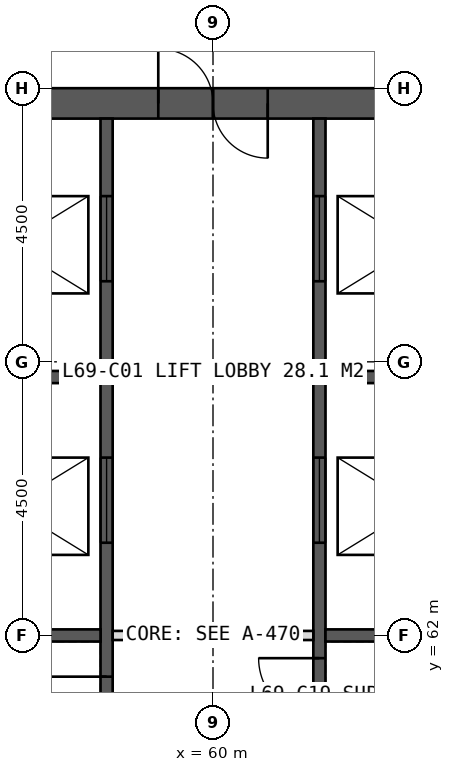
"""IFC4 building model, lengths in metres.
Left out: names, types, materials, properties, quantities, classifications, styles, units other than length and angle.
Written with IfcOpenShell. Run it as: python <this file> out.ifc"""

import sys

from ifc_helpers import new_model, si_unit, direction, frame, frame_2d, origin, place, context, subcontext, project, spatial, rectangle, extrude, element, fill, save


model = new_model("IFC4")
c1 = context("Model", 3, precision=1e-05, world=origin(), true_north=direction((0.0, 1.0)))
c2 = subcontext(c1, "Body", "Model", "MODEL_VIEW")
j1 = project(units=[si_unit("LENGTHUNIT", "METRE"), si_unit("PLANEANGLEUNIT", "RADIAN")], contexts=[c1])
p1 = place(None, origin())
s1 = spatial("IfcSite", under=j1, at=p1, CompositionType="ELEMENT")
p2 = place(p1, origin())
s2 = spatial("IfcBuilding", under=s1, at=p2, CompositionType="ELEMENT")
p3 = place(p2, frame((0.0, 0.0, 286.0)))
s3 = spatial("IfcBuildingStorey", under=s2, at=p3, CompositionType="ELEMENT", Elevation=286.0)
p4 = place(p3, frame((51.0, 70.75, 0.0), z_axis=(0.0, 0.0, 1.0), x_axis=(1.0, 0.0, 0.0)))
e1 = element("IfcWall", 1, at=p4, inside=s3, PredefinedType="SHEAR", context=c2, shape_type="SweptSolid", body=[
    extrude(rectangle(XDim=18.0, YDim=0.5, at=frame_2d((9.0, 0.0))), origin(), (0.0, 0.0, 1.0), 4.0),
])
p5 = place(p4, frame((8.1, 0.0, 0.0)))
e2 = element("IfcOpeningElement", 2, at=p5, cuts=e1, PredefinedType="OPENING", context=c2, shape_type="SweptSolid", body=[
    extrude(rectangle(XDim=1.8, YDim=2.2, at=frame_2d((0.9, 1.1))), frame((0.0, 0.26, 0.0), z_axis=(0.0, -1.0, 0.0), x_axis=(1.0, 0.0, 0.0)), (0.0, 0.0, 1.0), 0.52),
])
p6 = place(p3, frame((58.25, 53.5, 0.0), z_axis=(0.0, 0.0, 1.0), x_axis=(0.0, 1.0, 0.0)))
e3 = element("IfcWall", 3, at=p6, inside=s3, PredefinedType="SHEAR", context=c2, shape_type="SweptSolid", body=[
    extrude(rectangle(XDim=17.0, YDim=0.2, at=frame_2d((8.5, 0.0))), origin(), (0.0, 0.0, 1.0), 4.0),
])
p7 = place(p6, frame((0.808, 0.0, 0.0)))
e4 = element("IfcOpeningElement", 4, at=p7, cuts=e3, PredefinedType="OPENING", context=c2, shape_type="SweptSolid", body=[
    extrude(rectangle(XDim=1.0, YDim=2.1, at=frame_2d((0.5, 1.05))), frame((0.0, 0.11, 0.0), z_axis=(0.0, -1.0, 0.0), x_axis=(1.0, 0.0, 0.0)), (0.0, 0.0, 1.0), 0.22),
])
p8 = place(p6, frame((2.958, 0.0, 0.0)))
e5 = element("IfcOpeningElement", 5, at=p8, cuts=e3, PredefinedType="OPENING", context=c2, shape_type="SweptSolid", body=[
    extrude(rectangle(XDim=1.0, YDim=2.1, at=frame_2d((0.5, 1.05))), frame((0.0, 0.11, 0.0), z_axis=(0.0, -1.0, 0.0), x_axis=(1.0, 0.0, 0.0)), (0.0, 0.0, 1.0), 0.22),
])
p9 = place(p6, frame((4.722, 0.0, 0.0)))
e6 = element("IfcOpeningElement", 6, at=p9, cuts=e3, PredefinedType="OPENING", context=c2, shape_type="SweptSolid", body=[
    extrude(rectangle(XDim=1.0, YDim=2.1, at=frame_2d((0.5, 1.05))), frame((0.0, 0.11, 0.0), z_axis=(0.0, -1.0, 0.0), x_axis=(1.0, 0.0, 0.0)), (0.0, 0.0, 1.0), 0.22),
])
p10 = place(p6, frame((6.823, 0.0, 0.0)))
e7 = element("IfcOpeningElement", 7, at=p10, cuts=e3, PredefinedType="OPENING", context=c2, shape_type="SweptSolid", body=[
    extrude(rectangle(XDim=1.0, YDim=2.1, at=frame_2d((0.5, 1.05))), frame((0.0, 0.11, 0.0), z_axis=(0.0, -1.0, 0.0), x_axis=(1.0, 0.0, 0.0)), (0.0, 0.0, 1.0), 0.22),
])
p11 = place(p6, frame((10.025, 0.0, 0.0)))
e8 = element("IfcOpeningElement", 8, at=p11, cuts=e3, PredefinedType="OPENING", context=c2, shape_type="SweptSolid", body=[
    extrude(rectangle(XDim=1.4, YDim=2.2, at=frame_2d((0.7, 1.1))), frame((0.0, 0.11, 0.0), z_axis=(0.0, -1.0, 0.0), x_axis=(1.0, 0.0, 0.0)), (0.0, 0.0, 1.0), 0.22),
])
p12 = place(p6, frame((14.325, 0.0, 0.0)))
e9 = element("IfcOpeningElement", 9, at=p12, cuts=e3, PredefinedType="OPENING", context=c2, shape_type="SweptSolid", body=[
    extrude(rectangle(XDim=1.4, YDim=2.2, at=frame_2d((0.7, 1.1))), frame((0.0, 0.11, 0.0), z_axis=(0.0, -1.0, 0.0), x_axis=(1.0, 0.0, 0.0)), (0.0, 0.0, 1.0), 0.22),
])
p13 = place(p3, frame((61.75, 53.5, 0.0), z_axis=(0.0, 0.0, 1.0), x_axis=(0.0, 1.0, 0.0)))
e10 = element("IfcWall", 10, at=p13, inside=s3, PredefinedType="SHEAR", context=c2, shape_type="SweptSolid", body=[
    extrude(rectangle(XDim=17.0, YDim=0.2, at=frame_2d((8.5, 0.0))), origin(), (0.0, 0.0, 1.0), 4.0),
])
p14 = place(p13, frame((0.496, 0.0, 0.0)))
e11 = element("IfcOpeningElement", 11, at=p14, cuts=e10, PredefinedType="OPENING", context=c2, shape_type="SweptSolid", body=[
    extrude(rectangle(XDim=1.0, YDim=2.1, at=frame_2d((0.5, 1.05))), frame((0.0, 0.11, 0.0), z_axis=(0.0, -1.0, 0.0), x_axis=(1.0, 0.0, 0.0)), (0.0, 0.0, 1.0), 0.22),
])
p15 = place(p13, frame((2.646, 0.0, 0.0)))
e12 = element("IfcOpeningElement", 12, at=p15, cuts=e10, PredefinedType="OPENING", context=c2, shape_type="SweptSolid", body=[
    extrude(rectangle(XDim=1.0, YDim=2.1, at=frame_2d((0.5, 1.05))), frame((0.0, 0.11, 0.0), z_axis=(0.0, -1.0, 0.0), x_axis=(1.0, 0.0, 0.0)), (0.0, 0.0, 1.0), 0.22),
])
p16 = place(p13, frame((5.027, 0.0, 0.0)))
e13 = element("IfcOpeningElement", 13, at=p16, cuts=e10, PredefinedType="OPENING", context=c2, shape_type="SweptSolid", body=[
    extrude(rectangle(XDim=1.0, YDim=2.1, at=frame_2d((0.5, 1.05))), frame((0.0, 0.11, 0.0), z_axis=(0.0, -1.0, 0.0), x_axis=(1.0, 0.0, 0.0)), (0.0, 0.0, 1.0), 0.22),
])
p17 = place(p13, frame((7.126, 0.0, 0.0)))
e14 = element("IfcOpeningElement", 14, at=p17, cuts=e10, PredefinedType="OPENING", context=c2, shape_type="SweptSolid", body=[
    extrude(rectangle(XDim=1.0, YDim=2.1, at=frame_2d((0.5, 1.05))), frame((0.0, 0.11, 0.0), z_axis=(0.0, -1.0, 0.0), x_axis=(1.0, 0.0, 0.0)), (0.0, 0.0, 1.0), 0.22),
])
p18 = place(p13, frame((10.025, 0.0, 0.0)))
e15 = element("IfcOpeningElement", 15, at=p18, cuts=e10, PredefinedType="OPENING", context=c2, shape_type="SweptSolid", body=[
    extrude(rectangle(XDim=1.4, YDim=2.2, at=frame_2d((0.7, 1.1))), frame((0.0, 0.11, 0.0), z_axis=(0.0, -1.0, 0.0), x_axis=(1.0, 0.0, 0.0)), (0.0, 0.0, 1.0), 0.22),
])
p19 = place(p13, frame((14.325, 0.0, 0.0)))
e16 = element("IfcOpeningElement", 16, at=p19, cuts=e10, PredefinedType="OPENING", context=c2, shape_type="SweptSolid", body=[
    extrude(rectangle(XDim=1.4, YDim=2.2, at=frame_2d((0.7, 1.1))), frame((0.0, 0.11, 0.0), z_axis=(0.0, -1.0, 0.0), x_axis=(1.0, 0.0, 0.0)), (0.0, 0.0, 1.0), 0.22),
])
for number, where, z_axis, x_axis in (
    (17, (55.1, 62.0, 0.0), (0.0, 0.0, 1.0), (1.0, 0.0, 0.0)),
    (18, (61.85, 62.0, 0.0), (0.0, 0.0, 1.0), (1.0, 0.0, 0.0)),
    (19, (55.1, 66.25, 0.0), (0.0, 0.0, 1.0), (1.0, 0.0, 0.0)),
    (20, (61.85, 66.25, 0.0), (0.0, 0.0, 1.0), (1.0, 0.0, 0.0)),
):
    element("IfcWall", number, at=place(p3, frame(where, z_axis=z_axis, x_axis=x_axis)), inside=s3, PredefinedType="SHEAR", context=c2, shape_type="SweptSolid", body=[
        extrude(rectangle(XDim=3.05, YDim=0.2, at=frame_2d((1.525, 0.0))), origin(), (0.0, 0.0, 1.0), 4.0),
    ])
p20 = place(p3, frame((58.35, 62.0, 0.0), z_axis=(0.0, 0.0, 1.0), x_axis=(1.0, 0.0, 0.0)))
e21 = element("IfcWall", 21, at=p20, inside=s3, PredefinedType="PARTITIONING", context=c2, shape_type="SweptSolid", body=[
    extrude(rectangle(XDim=3.3, YDim=0.15, at=frame_2d((1.65, 0.0))), origin(), (0.0, 0.0, 1.0), 3.75),
])
p21 = place(p5, origin())
e22 = element("IfcDoor", 22, at=p21, inside=s3, OperationType="DOUBLE_DOOR_SINGLE_SWING", PredefinedType="DOOR", context=c2, shape_type="SweptSolid", body=[
    extrude(rectangle(XDim=1.8, YDim=2.2, at=frame_2d((0.9, 1.1))), frame((0.0, 0.025, 0.0), z_axis=(0.0, -1.0, 0.0), x_axis=(1.0, 0.0, 0.0)), (0.0, 0.0, 1.0), 0.05),
])
fill(e2, e22)
p22 = place(p10, origin())
e23 = element("IfcDoor", 23, at=p22, inside=s3, OperationType="SINGLE_SWING_RIGHT", PredefinedType="DOOR", context=c2, shape_type="SweptSolid", body=[
    extrude(rectangle(XDim=1.0, YDim=2.1, at=frame_2d((0.5, 1.05))), frame((0.0, 0.025, 0.0), z_axis=(0.0, -1.0, 0.0), x_axis=(1.0, 0.0, 0.0)), (0.0, 0.0, 1.0), 0.05),
])
fill(e7, e23)
p23 = place(p17, origin())
e24 = element("IfcDoor", 24, at=p23, inside=s3, OperationType="SINGLE_SWING_RIGHT", PredefinedType="DOOR", context=c2, shape_type="SweptSolid", body=[
    extrude(rectangle(XDim=1.0, YDim=2.1, at=frame_2d((0.5, 1.05))), frame((0.0, 0.025, 0.0), z_axis=(0.0, -1.0, 0.0), x_axis=(1.0, 0.0, 0.0)), (0.0, 0.0, 1.0), 0.05),
])
fill(e14, e24)
p24 = place(p11, origin())
e25 = element("IfcDoor", 25, at=p24, inside=s3, OperationType="SLIDING_TO_LEFT", PredefinedType="DOOR", context=c2, shape_type="SweptSolid", body=[
    extrude(rectangle(XDim=1.4, YDim=2.2, at=frame_2d((0.7, 1.1))), frame((0.0, 0.025, 0.0), z_axis=(0.0, -1.0, 0.0), x_axis=(1.0, 0.0, 0.0)), (0.0, 0.0, 1.0), 0.05),
])
fill(e8, e25)
p25 = place(p18, origin())
e26 = element("IfcDoor", 26, at=p25, inside=s3, OperationType="SLIDING_TO_LEFT", PredefinedType="DOOR", context=c2, shape_type="SweptSolid", body=[
    extrude(rectangle(XDim=1.4, YDim=2.2, at=frame_2d((0.7, 1.1))), frame((0.0, 0.025, 0.0), z_axis=(0.0, -1.0, 0.0), x_axis=(1.0, 0.0, 0.0)), (0.0, 0.0, 1.0), 0.05),
])
fill(e15, e26)
p26 = place(p12, origin())
e27 = element("IfcDoor", 27, at=p26, inside=s3, OperationType="SLIDING_TO_LEFT", PredefinedType="DOOR", context=c2, shape_type="SweptSolid", body=[
    extrude(rectangle(XDim=1.4, YDim=2.2, at=frame_2d((0.7, 1.1))), frame((0.0, 0.025, 0.0), z_axis=(0.0, -1.0, 0.0), x_axis=(1.0, 0.0, 0.0)), (0.0, 0.0, 1.0), 0.05),
])
fill(e9, e27)
p27 = place(p19, origin())
e28 = element("IfcDoor", 28, at=p27, inside=s3, OperationType="SLIDING_TO_LEFT", PredefinedType="DOOR", context=c2, shape_type="SweptSolid", body=[
    extrude(rectangle(XDim=1.4, YDim=2.2, at=frame_2d((0.7, 1.1))), frame((0.0, 0.025, 0.0), z_axis=(0.0, -1.0, 0.0), x_axis=(1.0, 0.0, 0.0)), (0.0, 0.0, 1.0), 0.05),
])
fill(e16, e28)
save(model, sys.argv[1])
